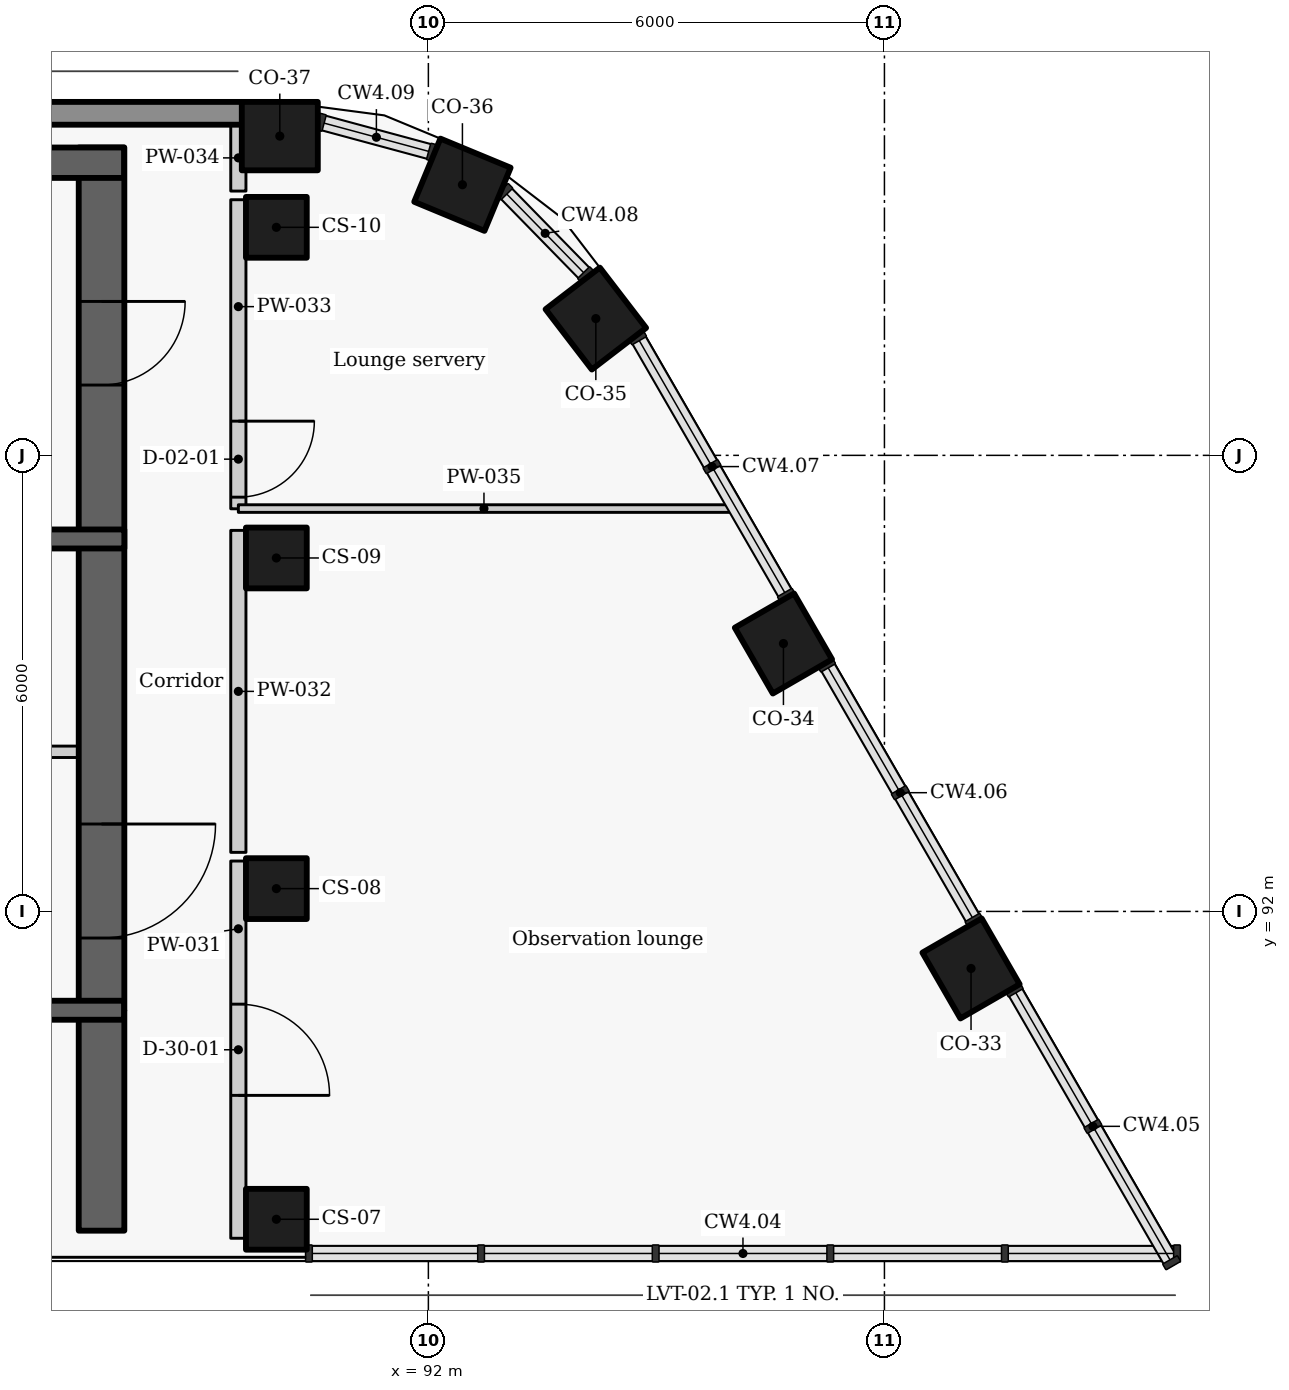
"""IFC4 building model, lengths in metres.
Left out: names, types, materials, properties, quantities, classifications, styles, units other than length and angle.
Written with IfcOpenShell. Run it as: python <this file> out.ifc"""

import sys

from ifc_helpers import new_model, si_unit, direction, frame, frame_2d, origin, origin_2d, place, context, subcontext, project, spatial, rectangle, extrude, element, fill, save


model = new_model("IFC4")
c1 = context("Model", 3, precision=1e-05, world=origin(), true_north=direction((0.0, 1.0)))
c2 = subcontext(c1, "Body", "Model", "MODEL_VIEW")
j1 = project(units=[si_unit("LENGTHUNIT", "METRE"), si_unit("PLANEANGLEUNIT", "RADIAN")], contexts=[c1])
p1 = place(None, origin())
s1 = spatial("IfcSite", under=j1, at=p1, CompositionType="ELEMENT")
p2 = place(p1, origin())
s2 = spatial("IfcBuilding", under=s1, at=p2, CompositionType="ELEMENT")
p3 = place(p2, frame((0.0, 0.0, 290.4)))
s3 = spatial("IfcBuildingStorey", under=s2, at=p3, CompositionType="ELEMENT", Elevation=290.4)
for number, where, z_axis, x_axis in (
    (1, (99.139, 91.25, 0.0), (0.0, 0.0, 1.0), (-0.5, 0.866, 0.0)),
    (2, (96.671, 95.525, 0.0), (0.0, 0.0, 1.0), (-0.5, 0.866, 0.0)),
    (3, (94.203, 99.8, 0.0), (0.0, 0.0, 1.0), (-0.609, 0.793, 0.0)),
    (4, (92.448, 101.56, 0.0), (0.0, 0.0, 1.0), (-0.924, 0.383, 0.0)),
    (5, (90.045, 102.2, 0.0), (0.0, 0.0, 1.0), (-1.0, 0.0, 0.0)),
):
    element("IfcColumn", number, at=place(p3, frame(where, z_axis=z_axis, x_axis=x_axis)), inside=s3, PredefinedType="COLUMN", context=c2, shape_type="SweptSolid", body=[
        extrude(rectangle(XDim=1.0, YDim=0.9, at=origin_2d()), origin(), (0.0, 0.0, 1.0), 3.6),
    ])
for number, where, z_axis, x_axis in (
    (6, (90.0, 87.95, 0.0), (0.0, 0.0, 1.0), (0.0, 1.0, 0.0)),
    (7, (90.0, 92.3, 0.0), (0.0, 0.0, 1.0), (0.0, 1.0, 0.0)),
    (8, (90.0, 96.65, 0.0), (0.0, 0.0, 1.0), (0.0, 1.0, 0.0)),
    (9, (90.0, 101.0, 0.0), (0.0, 0.0, 1.0), (0.0, 1.0, 0.0)),
):
    element("IfcColumn", number, at=place(p3, frame(where, z_axis=z_axis, x_axis=x_axis)), inside=s3, PredefinedType="COLUMN", context=c2, shape_type="SweptSolid", body=[
        extrude(rectangle(XDim=0.8, YDim=0.8, at=origin_2d()), origin(), (0.0, 0.0, 1.0), 3.6),
    ])
p4 = place(p3, frame((89.549, 102.5, 0.0), z_axis=(0.0, 0.0, 1.0), x_axis=(-1.0, 0.0, 0.0)))
e10 = element("IfcWall", 10, at=p4, inside=s3, PredefinedType="SOLIDWALL", context=c2, shape_type="SweptSolid", body=[
    extrude(rectangle(XDim=19.134, YDim=0.3, at=frame_2d((9.567, 0.0))), origin(), (0.0, 0.0, 1.0), 2.725),
])
p5 = place(p3, frame((85.397, 94.1, 0.0), z_axis=(0.0, 0.0, 1.0), x_axis=(1.0, 0.0, 0.0)))
e11 = element("IfcWall", 11, at=p5, inside=s3, PredefinedType="PARTITIONING", context=c2, shape_type="SweptSolid", body=[
    extrude(rectangle(XDim=2.603, YDim=0.15, at=frame_2d((1.302, 0.0))), origin(), (0.0, 0.0, 1.0), 3.325),
])
p6 = place(p5, frame((0.528, 0.0, 0.0)))
e12 = element("IfcOpeningElement", 12, at=p6, cuts=e11, PredefinedType="OPENING", context=c2, shape_type="SweptSolid", body=[
    extrude(rectangle(XDim=0.9, YDim=2.1, at=frame_2d((0.45, 1.05))), frame((0.0, 0.085, 0.0), z_axis=(0.0, -1.0, 0.0), x_axis=(1.0, 0.0, 0.0)), (0.0, 0.0, 1.0), 0.17),
])
p7 = place(p3, frame((87.7, 102.05, -0.275), z_axis=(0.0, 0.0, 1.0), x_axis=(0.0, -1.0, 0.0)))
e13 = element("IfcWall", 13, at=p7, inside=s3, PredefinedType="SHEAR", context=c2, shape_type="SweptSolid", body=[
    extrude(rectangle(XDim=11.35, YDim=0.6, at=frame_2d((5.675, 0.0))), origin(), (0.0, 0.0, 1.0), 3.6),
])
p8 = place(p7, frame((8.9, 0.0, 0.275)))
e14 = element("IfcOpeningElement", 14, at=p8, cuts=e13, PredefinedType="OPENING", context=c2, shape_type="SweptSolid", body=[
    extrude(rectangle(XDim=1.5, YDim=2.1, at=frame_2d((0.75, 1.05))), frame((0.0, 0.31, 0.0), z_axis=(0.0, -1.0, 0.0), x_axis=(1.0, 0.0, 0.0)), (0.0, 0.0, 1.0), 0.62),
])
p9 = place(p7, frame((2.025, 0.0, 0.275)))
e15 = element("IfcOpeningElement", 15, at=p9, cuts=e13, PredefinedType="OPENING", context=c2, shape_type="SweptSolid", body=[
    extrude(rectangle(XDim=1.1, YDim=2.1, at=frame_2d((0.55, 1.05))), frame((0.0, 0.31, 0.0), z_axis=(0.0, -1.0, 0.0), x_axis=(1.0, 0.0, 0.0)), (0.0, 0.0, 1.0), 0.62),
])
p10 = place(p3, frame((80.547, 96.9, -0.275), z_axis=(0.0, 0.0, 1.0), x_axis=(1.0, 0.0, 0.0)))
e16 = element("IfcWall", 16, at=p10, inside=s3, PredefinedType="SHEAR", context=c2, shape_type="SweptSolid", body=[
    extrude(rectangle(XDim=7.453, YDim=0.25, at=frame_2d((3.727, 0.0))), origin(), (0.0, 0.0, 1.0), 3.6),
])
p11 = place(p10, frame((3.302, 0.0, 0.275)))
e17 = element("IfcOpeningElement", 17, at=p11, cuts=e16, PredefinedType="OPENING", context=c2, shape_type="SweptSolid", body=[
    extrude(rectangle(XDim=1.1, YDim=2.1, at=frame_2d((0.55, 1.05))), frame((0.0, 0.135, 0.0), z_axis=(0.0, -1.0, 0.0), x_axis=(1.0, 0.0, 0.0)), (0.0, 0.0, 1.0), 0.27),
])
p12 = place(p3, frame((89.5, 92.663, 0.0), z_axis=(0.0, 0.0, 1.0), x_axis=(0.0, -1.0, 0.0)))
e18 = element("IfcWall", 18, at=p12, inside=s3, PredefinedType="PARTITIONING", context=c2, shape_type="SweptSolid", body=[
    extrude(rectangle(XDim=4.963, YDim=0.2, at=frame_2d((2.481, 0.0))), origin(), (0.0, 0.0, 1.0), 3.325),
])
p13 = place(p12, frame((1.883, 0.0, 0.0)))
e19 = element("IfcOpeningElement", 19, at=p13, cuts=e18, PredefinedType="OPENING", context=c2, shape_type="SweptSolid", body=[
    extrude(rectangle(XDim=1.2, YDim=2.1, at=frame_2d((0.6, 1.05))), frame((0.0, 0.11, 0.0), z_axis=(0.0, -1.0, 0.0), x_axis=(1.0, 0.0, 0.0)), (0.0, 0.0, 1.0), 0.22),
])
p14 = place(p3, frame((89.5, 92.777, 0.0), z_axis=(0.0, 0.0, 1.0), x_axis=(0.0, 1.0, 0.0)))
e20 = element("IfcWall", 20, at=p14, inside=s3, PredefinedType="PARTITIONING", context=c2, shape_type="SweptSolid", body=[
    extrude(rectangle(XDim=4.236, YDim=0.2, at=frame_2d((2.118, 0.0))), origin(), (0.0, 0.0, 1.0), 3.325),
])
p15 = place(p3, frame((89.5, 101.363, 0.0), z_axis=(0.0, 0.0, 1.0), x_axis=(0.0, -1.0, 0.0)))
e21 = element("IfcWall", 21, at=p15, inside=s3, PredefinedType="PARTITIONING", context=c2, shape_type="SweptSolid", body=[
    extrude(rectangle(XDim=4.066, YDim=0.2, at=frame_2d((2.033, 0.0))), origin(), (0.0, 0.0, 1.0), 3.325),
])
p16 = place(p15, frame((2.913, 0.0, 0.0)))
e22 = element("IfcOpeningElement", 22, at=p16, cuts=e21, PredefinedType="OPENING", context=c2, shape_type="SweptSolid", body=[
    extrude(rectangle(XDim=1.0, YDim=2.1, at=frame_2d((0.5, 1.05))), frame((0.0, 0.11, 0.0), z_axis=(0.0, -1.0, 0.0), x_axis=(1.0, 0.0, 0.0)), (0.0, 0.0, 1.0), 0.22),
])
p17 = place(p3, frame((89.5, 101.477, 0.0), z_axis=(0.0, 0.0, 1.0), x_axis=(0.0, 1.0, 0.0)))
e23 = element("IfcWall", 23, at=p17, inside=s3, PredefinedType="PARTITIONING", context=c2, shape_type="SweptSolid", body=[
    extrude(rectangle(XDim=0.873, YDim=0.2, at=frame_2d((0.437, 0.0))), origin(), (0.0, 0.0, 1.0), 3.325),
])
p18 = place(p3, frame((89.5, 97.3, 0.0), z_axis=(0.0, 0.0, 1.0), x_axis=(1.0, 0.0, 0.0)))
e24 = element("IfcWall", 24, at=p18, inside=s3, PredefinedType="PARTITIONING", context=c2, shape_type="SweptSolid", body=[
    extrude(rectangle(XDim=6.463, YDim=0.1, at=frame_2d((3.231, 0.0))), origin(), (0.0, 0.0, 1.0), 2.705),
])
p19 = place(p3, frame((87.7, 87.8, -0.275), z_axis=(0.0, 0.0, 1.0), x_axis=(0.0, 1.0, 0.0)))
e25 = element("IfcWall", 25, at=p19, inside=s3, PredefinedType="SHEAR", context=c2, shape_type="SweptSolid", body=[
    extrude(rectangle(XDim=2.896, YDim=0.6, at=frame_2d((1.448, 0.0))), origin(), (0.0, 0.0, 1.0), 3.6),
])
p20 = place(p3, frame((85.404, 90.7, -0.275), z_axis=(0.0, 0.0, 1.0), x_axis=(1.0, 0.0, 0.0)))
e26 = element("IfcWall", 26, at=p20, inside=s3, PredefinedType="SHEAR", context=c2, shape_type="SweptSolid", body=[
    extrude(rectangle(XDim=2.592, YDim=0.25, at=frame_2d((1.296, 0.0))), origin(), (0.0, 0.0, 1.0), 3.6),
])
p21 = place(p3, frame((72.004, 101.85, -0.275), z_axis=(0.0, 0.0, 1.0), x_axis=(1.0, 0.0, 0.0)))
e27 = element("IfcWall", 27, at=p21, inside=s3, PredefinedType="SHEAR", context=c2, shape_type="SweptSolid", body=[
    extrude(rectangle(XDim=15.992, YDim=0.4, at=frame_2d((7.996, 0.0))), origin(), (0.0, 0.0, 1.0), 3.6),
])
p22 = place(p13, origin())
e28 = element("IfcDoor", 28, at=p22, inside=s3, OperationType="SINGLE_SWING_RIGHT", PredefinedType="DOOR", context=c2, shape_type="SweptSolid", body=[
    extrude(rectangle(XDim=1.2, YDim=2.1, at=frame_2d((0.6, 1.05))), frame((0.0, 0.025, 0.0), z_axis=(0.0, -1.0, 0.0), x_axis=(1.0, 0.0, 0.0)), (0.0, 0.0, 1.0), 0.05),
])
fill(e19, e28)
p23 = place(p16, origin())
e29 = element("IfcDoor", 29, at=p23, inside=s3, OperationType="SINGLE_SWING_LEFT", PredefinedType="DOOR", context=c2, shape_type="SweptSolid", body=[
    extrude(rectangle(XDim=1.0, YDim=2.1, at=frame_2d((0.5, 1.05))), frame((0.0, 0.025, 0.0), z_axis=(0.0, -1.0, 0.0), x_axis=(1.0, 0.0, 0.0)), (0.0, 0.0, 1.0), 0.05),
])
fill(e22, e29)
p24 = place(p8, origin())
e30 = element("IfcDoor", 30, at=p24, inside=s3, OperationType="DOUBLE_DOOR_SINGLE_SWING", PredefinedType="DOOR", context=c2, shape_type="SweptSolid", body=[
    extrude(rectangle(XDim=1.5, YDim=2.1, at=frame_2d((0.75, 1.05))), frame((0.0, 0.025, 0.0), z_axis=(0.0, -1.0, 0.0), x_axis=(1.0, 0.0, 0.0)), (0.0, 0.0, 1.0), 0.05),
])
fill(e14, e30)
p25 = place(p9, origin())
e31 = element("IfcDoor", 31, at=p25, inside=s3, OperationType="SINGLE_SWING_LEFT", PredefinedType="DOOR", context=c2, shape_type="SweptSolid", body=[
    extrude(rectangle(XDim=1.1, YDim=2.1, at=frame_2d((0.55, 1.05))), frame((0.0, 0.025, 0.0), z_axis=(0.0, -1.0, 0.0), x_axis=(1.0, 0.0, 0.0)), (0.0, 0.0, 1.0), 0.05),
])
fill(e15, e31)
save(model, sys.argv[1])
